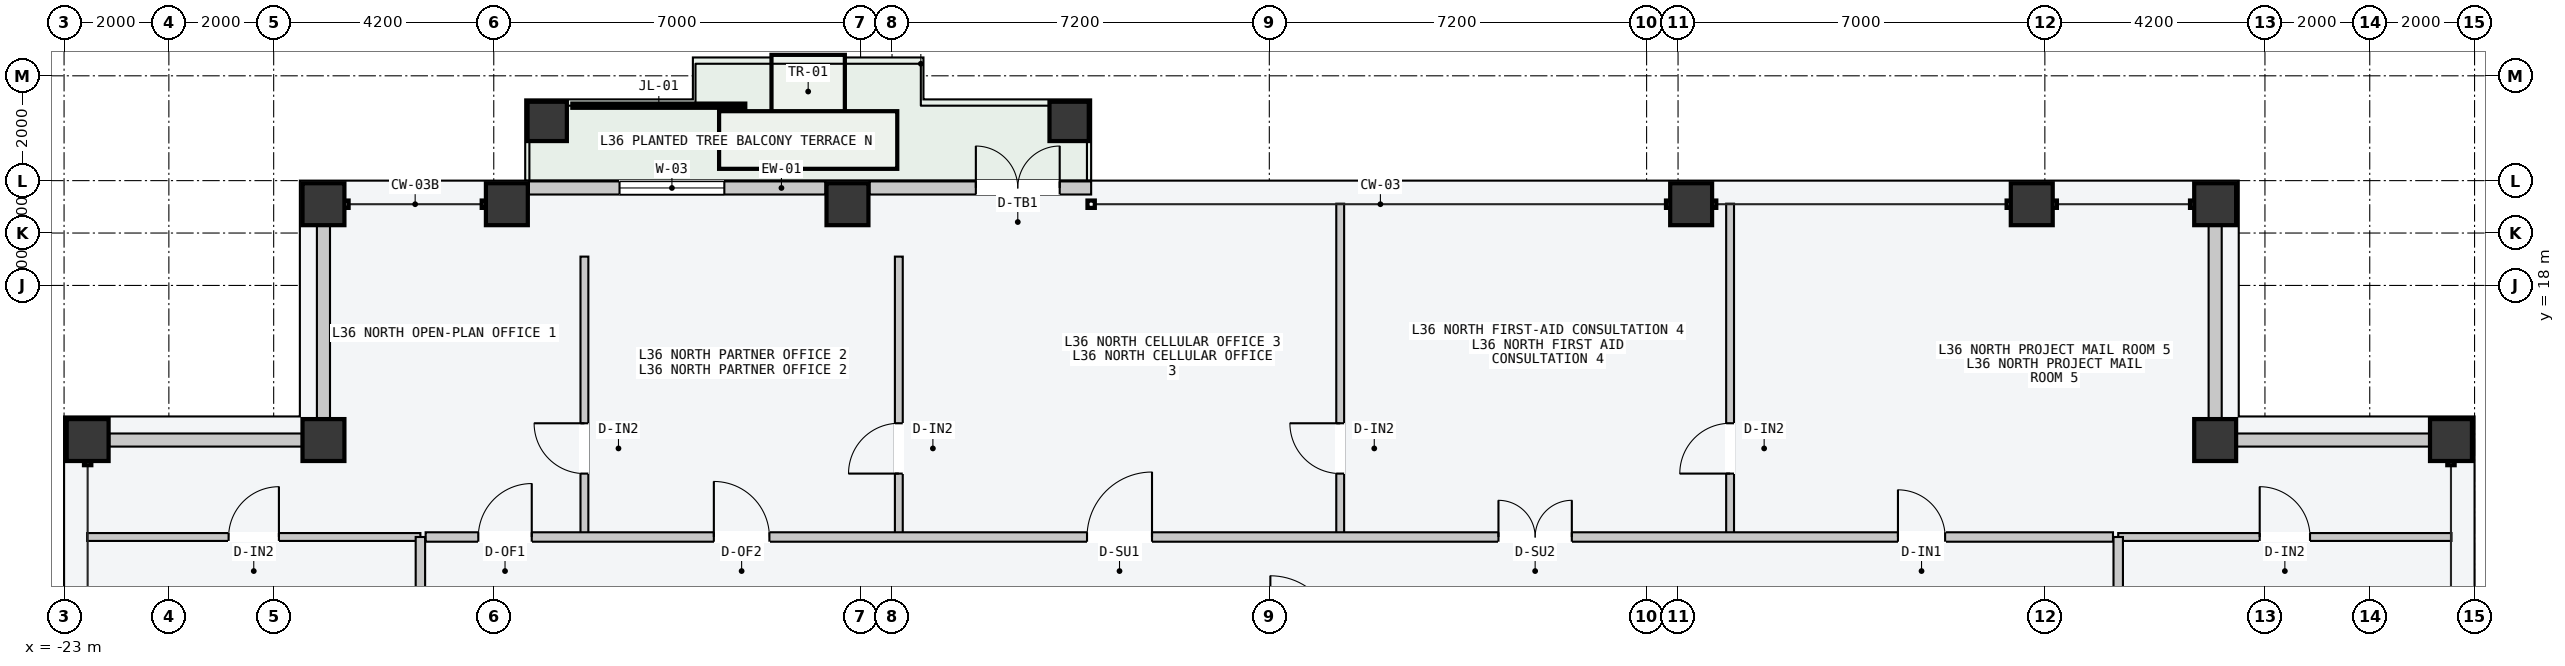
"""IFC4 building model, lengths in metres.
Left out: names, types, materials, properties, quantities, classifications, styles, units other than length and angle.
Written with IfcOpenShell. Run it as: python <this file> out.ifc"""

import sys

from ifc_helpers import new_model, si_unit, direction, frame, frame_2d, origin, origin_2d, place, context, subcontext, project, spatial, rectangle, hollow_rectangle, extrude, element, fill, save


model = new_model("IFC4")
c1 = context("Model", 3, precision=1e-05, world=origin(), true_north=direction((0.0, 1.0)))
c2 = subcontext(c1, "Body", "Model", "MODEL_VIEW")
j1 = project(units=[si_unit("LENGTHUNIT", "METRE"), si_unit("PLANEANGLEUNIT", "RADIAN")], contexts=[c1])
p1 = place(None, origin())
s1 = spatial("IfcSite", under=j1, at=p1, CompositionType="ELEMENT")
p2 = place(p1, origin())
s2 = spatial("IfcBuilding", under=s1, at=p2, CompositionType="ELEMENT")
p3 = place(p2, frame((0.0, 0.0, 138.6)))
s3 = spatial("IfcBuildingStorey", under=s2, at=p3, CompositionType="ELEMENT", Elevation=138.6)
for number, where, z_axis, x_axis in (
    (1, (-18.05, 19.55, 0.0), (0.0, 0.0, 1.0), (1.0, 0.0, 0.0)),
    (2, (-14.55, 19.55, 0.0), (0.0, 0.0, 1.0), (1.0, 0.0, 0.0)),
    (3, (-8.05, 19.55, 0.0), (0.0, 0.0, 1.0), (1.0, 0.0, 0.0)),
    (4, (8.05, 19.55, 0.0), (0.0, 0.0, 1.0), (1.0, 0.0, 0.0)),
    (5, (14.55, 19.55, 0.0), (0.0, 0.0, 1.0), (1.0, 0.0, 0.0)),
    (6, (18.05, 19.55, 0.0), (0.0, 0.0, 1.0), (1.0, 0.0, 0.0)),
    (7, (-22.55, 15.05, 0.0), (0.0, 0.0, 1.0), (0.0, 1.0, 0.0)),
    (8, (22.55, 15.05, 0.0), (0.0, 0.0, 1.0), (0.0, 1.0, 0.0)),
    (9, (-18.05, 15.05, 0.0), (0.0, 0.0, 1.0), (1.0, 0.0, 0.0)),
    (10, (18.05, 15.05, 0.0), (0.0, 0.0, 1.0), (1.0, 0.0, 0.0)),
):
    element("IfcColumn", number, at=place(p3, frame(where, z_axis=z_axis, x_axis=x_axis)), inside=s3, PredefinedType="COLUMN", context=c2, shape_type="SweptSolid", body=[
        extrude(hollow_rectangle(XDim=0.8, YDim=0.8, WallThickness=0.036, at=origin_2d()), origin(), (0.0, 0.0, 1.0), 3.6),
    ])
for number, where, z_axis, x_axis in (
    (11, (-13.78, 21.13, 0.0), (0.0, 0.0, 1.0), (1.0, 0.0, 0.0)),
    (12, (-3.82, 21.13, 0.0), (0.0, 0.0, 1.0), (1.0, 0.0, 0.0)),
):
    element("IfcColumn", number, at=place(p3, frame(where, z_axis=z_axis, x_axis=x_axis)), inside=s3, PredefinedType="COLUMN", context=c2, shape_type="SweptSolid", body=[
        extrude(hollow_rectangle(XDim=0.75, YDim=0.75, WallThickness=0.032, at=origin_2d()), origin(), (0.0, 0.0, 1.0), 3.6),
    ])
p4 = place(p3, frame((-14.13, 19.86, 0.0), z_axis=(0.0, 0.0, 1.0), x_axis=(1.0, 0.0, 0.0)))
e13 = element("IfcWall", 13, at=p4, inside=s3, PredefinedType="STANDARD", context=c2, shape_type="SweptSolid", body=[
    extrude(rectangle(XDim=5.66, YDim=0.25, at=frame_2d((2.83, 0.0))), origin(), (0.0, 0.0, 1.0), 3.4),
])
p5 = place(p4, frame((1.73, 0.0, 0.85)))
e14 = element("IfcOpeningElement", 14, at=p5, cuts=e13, PredefinedType="OPENING", context=c2, shape_type="SweptSolid", body=[
    extrude(rectangle(XDim=2.0, YDim=2.1, at=frame_2d((1.0, 1.05))), frame((0.0, 0.135, 0.0), z_axis=(0.0, -1.0, 0.0), x_axis=(1.0, 0.0, 0.0)), (0.0, 0.0, 1.0), 0.27),
])
p6 = place(p3, frame((-7.63, 19.86, 0.0), z_axis=(0.0, 0.0, 1.0), x_axis=(1.0, 0.0, 0.0)))
e15 = element("IfcWall", 15, at=p6, inside=s3, PredefinedType="STANDARD", context=c2, shape_type="SweptSolid", body=[
    extrude(rectangle(XDim=4.23, YDim=0.25, at=frame_2d((2.115, 0.0))), origin(), (0.0, 0.0, 1.0), 3.4),
])
p7 = place(p6, frame((2.03, 0.0, 0.0)))
e16 = element("IfcOpeningElement", 16, at=p7, cuts=e15, PredefinedType="OPENING", context=c2, shape_type="SweptSolid", body=[
    extrude(rectangle(XDim=1.6, YDim=2.2, at=frame_2d((0.8, 1.1))), frame((0.0, 0.135, 0.0), z_axis=(0.0, -1.0, 0.0), x_axis=(1.0, 0.0, 0.0)), (0.0, 0.0, 1.0), 0.27),
])
for number, where, z_axis, x_axis in (
    (17, (-22.14, 15.05, 0.0), (0.0, 0.0, 1.0), (1.0, 0.0, 0.0)),
    (18, (-18.05, 15.46, 0.0), (0.0, 0.0, 1.0), (0.0, 1.0, 0.0)),
    (19, (18.46, 15.05, 0.0), (0.0, 0.0, 1.0), (1.0, 0.0, 0.0)),
    (20, (18.05, 15.46, 0.0), (0.0, 0.0, 1.0), (0.0, 1.0, 0.0)),
):
    element("IfcWall", number, at=place(p3, frame(where, z_axis=z_axis, x_axis=x_axis)), inside=s3, PredefinedType="STANDARD", context=c2, shape_type="SweptSolid", body=[
        extrude(rectangle(XDim=3.68, YDim=0.25, at=frame_2d((1.84, 0.0))), origin(), (0.0, 0.0, 1.0), 2.75),
    ])
p8 = place(p3, frame((-13.07, 13.26, 0.0), z_axis=(0.0, 0.0, 1.0), x_axis=(0.0, 1.0, 0.0)))
e21 = element("IfcWall", 21, at=p8, inside=s3, PredefinedType="PARTITIONING", context=c2, shape_type="SweptSolid", body=[
    extrude(rectangle(XDim=5.29, YDim=0.15, at=frame_2d((2.645, 0.0))), origin(), (0.0, 0.0, 1.0), 3.4),
])
p9 = place(p8, frame((1.15, 0.0, 0.0)))
e22 = element("IfcOpeningElement", 22, at=p9, cuts=e21, PredefinedType="OPENING", context=c2, shape_type="SweptSolid", body=[
    extrude(rectangle(XDim=0.96, YDim=2.18, at=frame_2d((0.48, 1.09))), frame((0.0, 0.085, 0.0), z_axis=(0.0, -1.0, 0.0), x_axis=(1.0, 0.0, 0.0)), (0.0, 0.0, 1.0), 0.17),
])
p10 = place(p3, frame((-7.07, 13.26, 0.0), z_axis=(0.0, 0.0, 1.0), x_axis=(0.0, 1.0, 0.0)))
e23 = element("IfcWall", 23, at=p10, inside=s3, PredefinedType="PARTITIONING", context=c2, shape_type="SweptSolid", body=[
    extrude(rectangle(XDim=5.29, YDim=0.15, at=frame_2d((2.645, 0.0))), origin(), (0.0, 0.0, 1.0), 3.4),
])
p11 = place(p10, frame((1.15, 0.0, 0.0)))
e24 = element("IfcOpeningElement", 24, at=p11, cuts=e23, PredefinedType="OPENING", context=c2, shape_type="SweptSolid", body=[
    extrude(rectangle(XDim=0.96, YDim=2.18, at=frame_2d((0.48, 1.09))), frame((0.0, 0.085, 0.0), z_axis=(0.0, -1.0, 0.0), x_axis=(1.0, 0.0, 0.0)), (0.0, 0.0, 1.0), 0.17),
])
p12 = place(p3, frame((1.353, 13.26, 0.0), z_axis=(0.0, 0.0, 1.0), x_axis=(0.0, 1.0, 0.0)))
e25 = element("IfcWall", 25, at=p12, inside=s3, PredefinedType="PARTITIONING", context=c2, shape_type="SweptSolid", body=[
    extrude(rectangle(XDim=6.3, YDim=0.15, at=frame_2d((3.15, 0.0))), origin(), (0.0, 0.0, 1.0), 3.4),
])
p13 = place(p12, frame((1.15, 0.0, 0.0)))
e26 = element("IfcOpeningElement", 26, at=p13, cuts=e25, PredefinedType="OPENING", context=c2, shape_type="SweptSolid", body=[
    extrude(rectangle(XDim=0.96, YDim=2.18, at=frame_2d((0.48, 1.09))), frame((0.0, 0.085, 0.0), z_axis=(0.0, -1.0, 0.0), x_axis=(1.0, 0.0, 0.0)), (0.0, 0.0, 1.0), 0.17),
])
p14 = place(p3, frame((8.793, 13.26, 0.0), z_axis=(0.0, 0.0, 1.0), x_axis=(0.0, 1.0, 0.0)))
e27 = element("IfcWall", 27, at=p14, inside=s3, PredefinedType="PARTITIONING", context=c2, shape_type="SweptSolid", body=[
    extrude(rectangle(XDim=6.3, YDim=0.15, at=frame_2d((3.15, 0.0))), origin(), (0.0, 0.0, 1.0), 3.4),
])
p15 = place(p14, frame((1.15, 0.0, 0.0)))
e28 = element("IfcOpeningElement", 28, at=p15, cuts=e27, PredefinedType="OPENING", context=c2, shape_type="SweptSolid", body=[
    extrude(rectangle(XDim=0.96, YDim=2.18, at=frame_2d((0.48, 1.09))), frame((0.0, 0.085, 0.0), z_axis=(0.0, -1.0, 0.0), x_axis=(1.0, 0.0, 0.0)), (0.0, 0.0, 1.0), 0.17),
])
p16 = place(p3, frame((-16.1, 13.2, 0.0), z_axis=(0.0, 0.0, 1.0), x_axis=(1.0, 0.0, 0.0)))
e29 = element("IfcWall", 29, at=p16, inside=s3, PredefinedType="PARTITIONING", context=c2, shape_type="SweptSolid", body=[
    extrude(rectangle(XDim=32.2, YDim=0.18, at=frame_2d((16.1, 0.0))), origin(), (0.0, 0.0, 1.0), 3.4),
])
p17 = place(p16, frame((1.005, 0.0, 0.0)))
e30 = element("IfcOpeningElement", 30, at=p17, cuts=e29, PredefinedType="OPENING", context=c2, shape_type="SweptSolid", body=[
    extrude(rectangle(XDim=1.02, YDim=2.2, at=frame_2d((0.51, 1.1))), frame((0.0, 0.1, 0.0), z_axis=(0.0, -1.0, 0.0), x_axis=(1.0, 0.0, 0.0)), (0.0, 0.0, 1.0), 0.2),
])
p18 = place(p16, frame((5.5, 0.0, 0.0)))
e31 = element("IfcOpeningElement", 31, at=p18, cuts=e29, PredefinedType="OPENING", context=c2, shape_type="SweptSolid", body=[
    extrude(rectangle(XDim=1.06, YDim=2.2, at=frame_2d((0.53, 1.1))), frame((0.0, 0.1, 0.0), z_axis=(0.0, -1.0, 0.0), x_axis=(1.0, 0.0, 0.0)), (0.0, 0.0, 1.0), 0.2),
])
p19 = place(p16, frame((12.621, 0.0, 0.0)))
e32 = element("IfcOpeningElement", 32, at=p19, cuts=e29, PredefinedType="OPENING", context=c2, shape_type="SweptSolid", body=[
    extrude(rectangle(XDim=1.24, YDim=2.24, at=frame_2d((0.62, 1.12))), frame((0.0, 0.1, 0.0), z_axis=(0.0, -1.0, 0.0), x_axis=(1.0, 0.0, 0.0)), (0.0, 0.0, 1.0), 0.2),
])
p20 = place(p16, frame((20.473, 0.0, 0.0)))
e33 = element("IfcOpeningElement", 33, at=p20, cuts=e29, PredefinedType="OPENING", context=c2, shape_type="SweptSolid", body=[
    extrude(rectangle(XDim=1.4, YDim=2.2, at=frame_2d((0.7, 1.1))), frame((0.0, 0.1, 0.0), z_axis=(0.0, -1.0, 0.0), x_axis=(1.0, 0.0, 0.0)), (0.0, 0.0, 1.0), 0.2),
])
p21 = place(p16, frame((28.097, 0.0, 0.0)))
e34 = element("IfcOpeningElement", 34, at=p21, cuts=e29, PredefinedType="OPENING", context=c2, shape_type="SweptSolid", body=[
    extrude(rectangle(XDim=0.9, YDim=2.15, at=frame_2d((0.45, 1.075))), frame((0.0, 0.1, 0.0), z_axis=(0.0, -1.0, 0.0), x_axis=(1.0, 0.0, 0.0)), (0.0, 0.0, 1.0), 0.2),
])
p22 = place(p3, frame((-22.56, 13.2, 0.0), z_axis=(0.0, 0.0, 1.0), x_axis=(1.0, 0.0, 0.0)))
e35 = element("IfcWall", 35, at=p22, inside=s3, PredefinedType="PARTITIONING", context=c2, shape_type="SweptSolid", body=[
    extrude(rectangle(XDim=6.36, YDim=0.15, at=frame_2d((3.18, 0.0))), origin(), (0.0, 0.0, 1.0), 3.4),
])
p23 = place(p22, frame((2.7, 0.0, 0.0)))
e36 = element("IfcOpeningElement", 36, at=p23, cuts=e35, PredefinedType="OPENING", context=c2, shape_type="SweptSolid", body=[
    extrude(rectangle(XDim=0.96, YDim=2.18, at=frame_2d((0.48, 1.09))), frame((0.0, 0.085, 0.0), z_axis=(0.0, -1.0, 0.0), x_axis=(1.0, 0.0, 0.0)), (0.0, 0.0, 1.0), 0.17),
])
p24 = place(p3, frame((16.2, 13.2, 0.0), z_axis=(0.0, 0.0, 1.0), x_axis=(1.0, 0.0, 0.0)))
e37 = element("IfcWall", 37, at=p24, inside=s3, PredefinedType="PARTITIONING", context=c2, shape_type="SweptSolid", body=[
    extrude(rectangle(XDim=6.36, YDim=0.15, at=frame_2d((3.18, 0.0))), origin(), (0.0, 0.0, 1.0), 3.4),
])
p25 = place(p24, frame((2.7, 0.0, 0.0)))
e38 = element("IfcOpeningElement", 38, at=p25, cuts=e37, PredefinedType="OPENING", context=c2, shape_type="SweptSolid", body=[
    extrude(rectangle(XDim=0.96, YDim=2.18, at=frame_2d((0.48, 1.09))), frame((0.0, 0.085, 0.0), z_axis=(0.0, -1.0, 0.0), x_axis=(1.0, 0.0, 0.0)), (0.0, 0.0, 1.0), 0.17),
])
for number, where, z_axis, x_axis in (
    (39, (-16.2, 11.25, 0.0), (0.0, 0.0, 1.0), (0.0, 1.0, 0.0)),
    (40, (16.2, 11.25, 0.0), (0.0, 0.0, 1.0), (0.0, 1.0, 0.0)),
):
    element("IfcWall", number, at=place(p3, frame(where, z_axis=z_axis, x_axis=x_axis)), inside=s3, PredefinedType="PARTITIONING", context=c2, shape_type="SweptSolid", body=[
        extrude(rectangle(XDim=1.95, YDim=0.18, at=frame_2d((0.975, 0.0))), origin(), (0.0, 0.0, 1.0), 3.4),
    ])
p26 = place(p5, origin())
e41 = element("IfcWindow", 41, at=p26, inside=s3, PartitioningType="SINGLE_PANEL", PredefinedType="WINDOW", context=c2, shape_type="SweptSolid", body=[
    extrude(rectangle(XDim=2.0, YDim=2.1, at=frame_2d((1.0, 1.05))), frame((0.0, 0.03, 0.0), z_axis=(0.0, -1.0, 0.0), x_axis=(1.0, 0.0, 0.0)), (0.0, 0.0, 1.0), 0.06),
])
fill(e14, e41)
p27 = place(p7, origin())
e42 = element("IfcDoor", 42, at=p27, inside=s3, OperationType="DOUBLE_DOOR_SINGLE_SWING", PredefinedType="DOOR", context=c2, shape_type="SweptSolid", body=[
    extrude(rectangle(XDim=1.6, YDim=2.2, at=frame_2d((0.8, 1.1))), frame((0.0, 0.025, 0.0), z_axis=(0.0, -1.0, 0.0), x_axis=(1.0, 0.0, 0.0)), (0.0, 0.0, 1.0), 0.05),
])
fill(e16, e42)
p28 = place(p9, origin())
e43 = element("IfcDoor", 43, at=p28, inside=s3, OperationType="SINGLE_SWING_RIGHT", PredefinedType="DOOR", context=c2, shape_type="SweptSolid", body=[
    extrude(rectangle(XDim=0.96, YDim=2.18, at=frame_2d((0.48, 1.09))), frame((0.0, 0.025, 0.0), z_axis=(0.0, -1.0, 0.0), x_axis=(1.0, 0.0, 0.0)), (0.0, 0.0, 1.0), 0.05),
])
fill(e22, e43)
p29 = place(p11, origin())
e44 = element("IfcDoor", 44, at=p29, inside=s3, OperationType="SINGLE_SWING_LEFT", PredefinedType="DOOR", context=c2, shape_type="SweptSolid", body=[
    extrude(rectangle(XDim=0.96, YDim=2.18, at=frame_2d((0.48, 1.09))), frame((0.0, 0.025, 0.0), z_axis=(0.0, -1.0, 0.0), x_axis=(1.0, 0.0, 0.0)), (0.0, 0.0, 1.0), 0.05),
])
fill(e24, e44)
p30 = place(p13, origin())
e45 = element("IfcDoor", 45, at=p30, inside=s3, OperationType="SINGLE_SWING_RIGHT", PredefinedType="DOOR", context=c2, shape_type="SweptSolid", body=[
    extrude(rectangle(XDim=0.96, YDim=2.18, at=frame_2d((0.48, 1.09))), frame((0.0, 0.025, 0.0), z_axis=(0.0, -1.0, 0.0), x_axis=(1.0, 0.0, 0.0)), (0.0, 0.0, 1.0), 0.05),
])
fill(e26, e45)
p31 = place(p15, origin())
e46 = element("IfcDoor", 46, at=p31, inside=s3, OperationType="SINGLE_SWING_LEFT", PredefinedType="DOOR", context=c2, shape_type="SweptSolid", body=[
    extrude(rectangle(XDim=0.96, YDim=2.18, at=frame_2d((0.48, 1.09))), frame((0.0, 0.025, 0.0), z_axis=(0.0, -1.0, 0.0), x_axis=(1.0, 0.0, 0.0)), (0.0, 0.0, 1.0), 0.05),
])
fill(e28, e46)
p32 = place(p17, origin())
e47 = element("IfcDoor", 47, at=p32, inside=s3, OperationType="SINGLE_SWING_RIGHT", PredefinedType="DOOR", context=c2, shape_type="SweptSolid", body=[
    extrude(rectangle(XDim=1.02, YDim=2.2, at=frame_2d((0.51, 1.1))), frame((0.0, 0.025, 0.0), z_axis=(0.0, -1.0, 0.0), x_axis=(1.0, 0.0, 0.0)), (0.0, 0.0, 1.0), 0.05),
])
fill(e30, e47)
p33 = place(p18, origin())
e48 = element("IfcDoor", 48, at=p33, inside=s3, OperationType="SINGLE_SWING_LEFT", PredefinedType="DOOR", context=c2, shape_type="SweptSolid", body=[
    extrude(rectangle(XDim=1.06, YDim=2.2, at=frame_2d((0.53, 1.1))), frame((0.0, 0.025, 0.0), z_axis=(0.0, -1.0, 0.0), x_axis=(1.0, 0.0, 0.0)), (0.0, 0.0, 1.0), 0.05),
])
fill(e31, e48)
p34 = place(p19, origin())
e49 = element("IfcDoor", 49, at=p34, inside=s3, OperationType="SINGLE_SWING_RIGHT", PredefinedType="DOOR", context=c2, shape_type="SweptSolid", body=[
    extrude(rectangle(XDim=1.24, YDim=2.24, at=frame_2d((0.62, 1.12))), frame((0.0, 0.025, 0.0), z_axis=(0.0, -1.0, 0.0), x_axis=(1.0, 0.0, 0.0)), (0.0, 0.0, 1.0), 0.05),
])
fill(e32, e49)
p35 = place(p20, origin())
e50 = element("IfcDoor", 50, at=p35, inside=s3, OperationType="DOUBLE_DOOR_SINGLE_SWING", PredefinedType="DOOR", context=c2, shape_type="SweptSolid", body=[
    extrude(rectangle(XDim=1.4, YDim=2.2, at=frame_2d((0.7, 1.1))), frame((0.0, 0.025, 0.0), z_axis=(0.0, -1.0, 0.0), x_axis=(1.0, 0.0, 0.0)), (0.0, 0.0, 1.0), 0.05),
])
fill(e33, e50)
p36 = place(p21, origin())
e51 = element("IfcDoor", 51, at=p36, inside=s3, OperationType="SINGLE_SWING_LEFT", PredefinedType="DOOR", context=c2, shape_type="SweptSolid", body=[
    extrude(rectangle(XDim=0.9, YDim=2.15, at=frame_2d((0.45, 1.075))), frame((0.0, 0.025, 0.0), z_axis=(0.0, -1.0, 0.0), x_axis=(1.0, 0.0, 0.0)), (0.0, 0.0, 1.0), 0.05),
])
fill(e34, e51)
p37 = place(p23, origin())
e52 = element("IfcDoor", 52, at=p37, inside=s3, OperationType="SINGLE_SWING_RIGHT", PredefinedType="DOOR", context=c2, shape_type="SweptSolid", body=[
    extrude(rectangle(XDim=0.96, YDim=2.18, at=frame_2d((0.48, 1.09))), frame((0.0, 0.025, 0.0), z_axis=(0.0, -1.0, 0.0), x_axis=(1.0, 0.0, 0.0)), (0.0, 0.0, 1.0), 0.05),
])
fill(e36, e52)
p38 = place(p25, origin())
e53 = element("IfcDoor", 53, at=p38, inside=s3, OperationType="SINGLE_SWING_LEFT", PredefinedType="DOOR", context=c2, shape_type="SweptSolid", body=[
    extrude(rectangle(XDim=0.96, YDim=2.18, at=frame_2d((0.48, 1.09))), frame((0.0, 0.025, 0.0), z_axis=(0.0, -1.0, 0.0), x_axis=(1.0, 0.0, 0.0)), (0.0, 0.0, 1.0), 0.05),
])
fill(e38, e53)
save(model, sys.argv[1])
